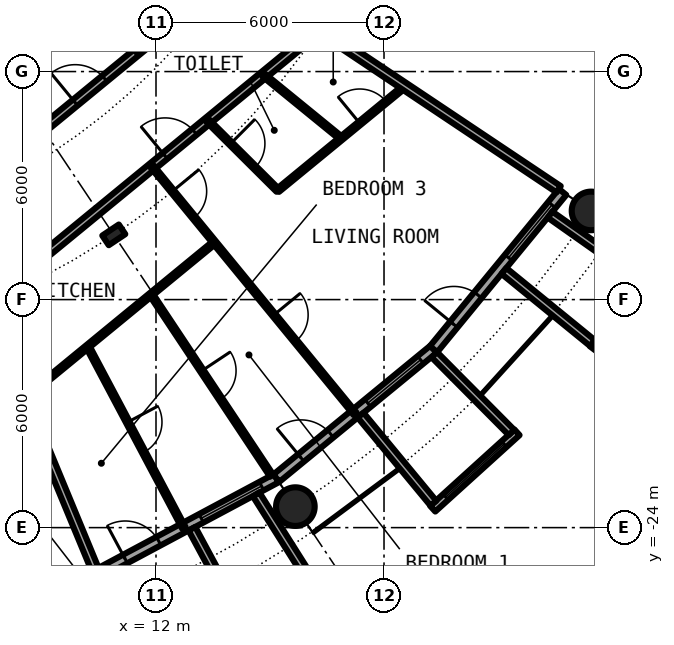
"""IFC4 building model, lengths in metres.
Left out: names, types, materials, properties, quantities, classifications, styles, units other than length and angle.
Written with IfcOpenShell. Run it as: python <this file> out.ifc"""

import sys

from ifc_helpers import new_model, si_unit, direction, frame, frame_2d, origin, origin_2d, place, context, subcontext, project, spatial, rectangle, circle, hollow_circle, i_section, extrude, element, fill, save


model = new_model("IFC4")
c1 = context("Model", 3, precision=1e-05, world=origin(), true_north=direction((0.0, 1.0)))
c2 = subcontext(c1, "Body", "Model", "MODEL_VIEW")
j1 = project(units=[si_unit("LENGTHUNIT", "METRE"), si_unit("PLANEANGLEUNIT", "RADIAN")], contexts=[c1])
p1 = place(None, origin())
s1 = spatial("IfcSite", under=j1, at=p1, CompositionType="ELEMENT")
p2 = place(p1, origin())
s2 = spatial("IfcBuilding", under=s1, at=p2, CompositionType="ELEMENT")
p3 = place(p2, frame((0.0, 0.0, 63.6)))
s3 = spatial("IfcBuildingStorey", under=s2, at=p3, CompositionType="ELEMENT", Elevation=63.6)
for number, where, z_axis, x_axis in (
    (1, (15.667, -23.448, 0.0), (0.0, 0.0, 1.0), (1.0, 0.0, 0.0)),
    (2, (23.448, -15.667, 0.0), (0.0, 0.0, 1.0), (1.0, 0.0, 0.0)),
):
    element("IfcColumn", number, at=place(p3, frame(where, z_axis=z_axis, x_axis=x_axis)), inside=s3, PredefinedType="COLUMN", context=c2, shape_type="SweptSolid", body=[
        extrude(hollow_circle(Radius=0.508, WallThickness=0.04, at=origin_2d()), origin(), (0.0, 0.0, 1.0), 3.05),
    ])
p4 = place(p3, frame((10.889, -16.297, 0.0), z_axis=(0.0, 0.0, 1.0), x_axis=(0.55557023302, -0.831469612303, 0.0)))
e3 = element("IfcColumn", 3, at=p4, inside=s3, PredefinedType="COLUMN", context=c2, shape_type="SweptSolid", body=[
    extrude(i_section(OverallWidth=0.306, OverallDepth=0.524, WebThickness=0.021, FlangeThickness=0.04, FilletRadius=0.027, at=origin_2d()), origin(), (0.0, 0.0, 1.0), 3.05),
])
p5 = place(p3, frame((10.447, -25.222, 0.0), z_axis=(0.0, 0.0, 1.0), x_axis=(0.881915646801, 0.471407246368, 0.0)))
e4 = element("IfcWall", 4, at=p5, inside=s3, PredefinedType="SOLIDWALL", context=c2, shape_type="SweptSolid", body=[
    extrude(rectangle(XDim=5.352, YDim=0.25, at=frame_2d((2.676, 0.0))), origin(), (0.0, 0.0, 1.0), 2.7),
])
p6 = place(p5, frame((0.841, 0.0, 0.0)))
e5 = element("IfcOpeningElement", 5, at=p6, cuts=e4, PredefinedType="OPENING", context=c2, shape_type="SweptSolid", body=[
    extrude(rectangle(XDim=1.0, YDim=2.2, at=frame_2d((0.5, 1.1))), frame((0.0, 0.135, 0.0), z_axis=(0.0, -1.0, 0.0), x_axis=(1.0, 0.0, 0.0)), (0.0, 0.0, 1.0), 0.27),
])
p7 = place(p5, frame((3.111, 0.0, 0.3)))
e6 = element("IfcOpeningElement", 6, at=p7, cuts=e4, PredefinedType="OPENING", context=c2, shape_type="SweptSolid", body=[
    extrude(rectangle(XDim=1.8, YDim=2.1, at=frame_2d((0.9, 1.05))), frame((0.0, 0.135, 0.0), z_axis=(0.0, -1.0, 0.0), x_axis=(1.0, 0.0, 0.0)), (0.0, 0.0, 1.0), 0.27),
])
p8 = place(p3, frame((12.945, -24.029, -0.03), z_axis=(0.0, 0.0, 1.0), x_axis=(0.474424310775, -0.88029629861, 0.0)))
e7 = element("IfcWall", 7, at=p8, inside=s3, PredefinedType="SOLIDWALL", context=c2, shape_type="SweptSolid", body=[
    extrude(rectangle(XDim=3.006, YDim=0.2, at=frame_2d((1.503, 0.0))), origin(), (0.0, 0.0, 1.0), 2.73),
])
p9 = place(p3, frame((14.635, -23.126, -0.03), z_axis=(0.0, 0.0, 1.0), x_axis=(0.534437802731, -0.845207805816, 0.0)))
e8 = element("IfcWall", 8, at=p9, inside=s3, PredefinedType="SOLIDWALL", context=c2, shape_type="SweptSolid", body=[
    extrude(rectangle(XDim=2.932, YDim=0.2, at=frame_2d((1.466, 0.0))), origin(), (0.0, 0.0, 1.0), 2.73),
])
p10 = place(p3, frame((15.167, -22.699, 0.0), z_axis=(0.0, 0.0, 1.0), x_axis=(0.773019449054, 0.634382322723, 0.0)))
e9 = element("IfcWall", 9, at=p10, inside=s3, PredefinedType="SOLIDWALL", context=c2, shape_type="SweptSolid", body=[
    extrude(rectangle(XDim=5.352, YDim=0.25, at=frame_2d((2.676, 0.0))), origin(), (0.0, 0.0, 1.0), 2.7),
])
p11 = place(p10, frame((0.841, 0.0, 0.0)))
e10 = element("IfcOpeningElement", 10, at=p11, cuts=e9, PredefinedType="OPENING", context=c2, shape_type="SweptSolid", body=[
    extrude(rectangle(XDim=1.0, YDim=2.2, at=frame_2d((0.5, 1.1))), frame((0.0, 0.135, 0.0), z_axis=(0.0, -1.0, 0.0), x_axis=(1.0, 0.0, 0.0)), (0.0, 0.0, 1.0), 0.27),
])
p12 = place(p10, frame((3.111, 0.0, 0.3)))
e11 = element("IfcOpeningElement", 11, at=p12, cuts=e9, PredefinedType="OPENING", context=c2, shape_type="SweptSolid", body=[
    extrude(rectangle(XDim=1.8, YDim=2.1, at=frame_2d((0.9, 1.05))), frame((0.0, 0.135, 0.0), z_axis=(0.0, -1.0, 0.0), x_axis=(1.0, 0.0, 0.0)), (0.0, 0.0, 1.0), 0.27),
])
p13 = place(p3, frame((19.282, -23.503, -0.03), z_axis=(0.0, 0.0, 1.0), x_axis=(0.740998365753, 0.671506829416, 0.0)))
e12 = element("IfcWall", 12, at=p13, inside=s3, PredefinedType="SOLIDWALL", context=c2, shape_type="SweptSolid", body=[
    extrude(rectangle(XDim=2.993, YDim=0.2, at=frame_2d((1.497, 0.0))), origin(), (0.0, 0.0, 1.0), 2.73),
])
p14 = place(p13, frame((0.457, 0.0, 0.33)))
e13 = element("IfcOpeningElement", 13, at=p14, cuts=e12, PredefinedType="OPENING", context=c2, shape_type="SweptSolid", body=[
    extrude(circle(Radius=1.04, at=frame_2d((1.04, 1.04))), frame((0.0, 0.11, 0.0), z_axis=(0.0, -1.0, 0.0), x_axis=(1.0, 0.0, 0.0)), (0.0, 0.0, 1.0), 0.22),
])
p15 = place(p3, frame((17.384, -21.041, -0.03), z_axis=(0.0, 0.0, 1.0), x_axis=(0.63709551667, -0.770784861449, 0.0)))
e14 = element("IfcWall", 14, at=p15, inside=s3, PredefinedType="SOLIDWALL", context=c2, shape_type="SweptSolid", body=[
    extrude(rectangle(XDim=3.006, YDim=0.2, at=frame_2d((1.503, 0.0))), origin(), (0.0, 0.0, 1.0), 2.73),
])
p16 = place(p3, frame((19.323, -19.45, -0.03), z_axis=(0.0, 0.0, 1.0), x_axis=(0.704476739375, -0.709727076896, 0.0)))
e15 = element("IfcWall", 15, at=p16, inside=s3, PredefinedType="SOLIDWALL", context=c2, shape_type="SweptSolid", body=[
    extrude(rectangle(XDim=2.883, YDim=0.2, at=frame_2d((1.441, 0.0))), origin(), (0.0, 0.0, 1.0), 2.73),
])
p17 = place(p3, frame((19.304, -19.304, 0.0), z_axis=(0.0, 0.0, 1.0), x_axis=(0.634382322723, 0.773019449054, 0.0)))
e16 = element("IfcWall", 16, at=p17, inside=s3, PredefinedType="SOLIDWALL", context=c2, shape_type="SweptSolid", body=[
    extrude(rectangle(XDim=5.352, YDim=0.25, at=frame_2d((2.676, 0.0))), origin(), (0.0, 0.0, 1.0), 2.7),
])
p18 = place(p17, frame((0.841, 0.0, 0.0)))
e17 = element("IfcOpeningElement", 17, at=p18, cuts=e16, PredefinedType="OPENING", context=c2, shape_type="SweptSolid", body=[
    extrude(rectangle(XDim=1.0, YDim=2.2, at=frame_2d((0.5, 1.1))), frame((0.0, 0.135, 0.0), z_axis=(0.0, -1.0, 0.0), x_axis=(1.0, 0.0, 0.0)), (0.0, 0.0, 1.0), 0.27),
])
p19 = place(p17, frame((3.111, 0.0, 0.3)))
e18 = element("IfcOpeningElement", 18, at=p19, cuts=e16, PredefinedType="OPENING", context=c2, shape_type="SweptSolid", body=[
    extrude(rectangle(XDim=1.8, YDim=2.1, at=frame_2d((0.9, 1.05))), frame((0.0, 0.135, 0.0), z_axis=(0.0, -1.0, 0.0), x_axis=(1.0, 0.0, 0.0)), (0.0, 0.0, 1.0), 0.27),
])
p20 = place(p3, frame((23.497, -19.289, -0.03), z_axis=(0.0, 0.0, 1.0), x_axis=(0.60418752353, 0.796842165306, 0.0)))
e19 = element("IfcWall", 19, at=p20, inside=s3, PredefinedType="SOLIDWALL", context=c2, shape_type="SweptSolid", body=[
    extrude(rectangle(XDim=2.337, YDim=0.2, at=frame_2d((1.168, 0.0))), origin(), (0.0, 0.0, 1.0), 2.73),
])
p21 = place(p20, frame((0.128, 0.0, 0.33)))
e20 = element("IfcOpeningElement", 20, at=p21, cuts=e19, PredefinedType="OPENING", context=c2, shape_type="SweptSolid", body=[
    extrude(circle(Radius=1.04, at=frame_2d((1.04, 1.04))), frame((0.0, 0.11, 0.0), z_axis=(0.0, -1.0, 0.0), x_axis=(1.0, 0.0, 0.0)), (0.0, 0.0, 1.0), 0.22),
])
p22 = place(p3, frame((21.155, -17.246, -0.03), z_axis=(0.0, 0.0, 1.0), x_axis=(0.775179004516, -0.631741648902, 0.0)))
e21 = element("IfcWall", 21, at=p22, inside=s3, PredefinedType="SOLIDWALL", context=c2, shape_type="SweptSolid", body=[
    extrude(rectangle(XDim=3.006, YDim=0.2, at=frame_2d((1.503, 0.0))), origin(), (0.0, 0.0, 1.0), 2.73),
])
p23 = place(p3, frame((22.37, -15.765, -0.03), z_axis=(0.0, 0.0, 1.0), x_axis=(0.817256123454, -0.576274612209, 0.0)))
e22 = element("IfcWall", 22, at=p23, inside=s3, PredefinedType="SOLIDWALL", context=c2, shape_type="SweptSolid", body=[
    extrude(rectangle(XDim=2.933, YDim=0.2, at=frame_2d((1.466, 0.0))), origin(), (0.0, 0.0, 1.0), 2.73),
])
p24 = place(p3, frame((8.534, -20.603, 0.0), z_axis=(0.0, 0.0, 1.0), x_axis=(0.773000340237, 0.634405606843, 0.0)))
e23 = element("IfcWall", 23, at=p24, inside=s3, PredefinedType="PARTITIONING", context=c2, shape_type="SweptSolid", body=[
    extrude(rectangle(XDim=6.474, YDim=0.1, at=frame_2d((3.237, 0.0))), origin(), (0.0, 0.0, 1.0), 2.7),
])
p25 = place(p3, frame((15.206, -15.127, 0.0), z_axis=(0.0, 0.0, 1.0), x_axis=(0.772975913823, 0.634435368379, 0.0)))
e24 = element("IfcWall", 24, at=p25, inside=s3, PredefinedType="PARTITIONING", context=c2, shape_type="SweptSolid", body=[
    extrude(rectangle(XDim=4.316, YDim=0.1, at=frame_2d((2.158, 0.0))), origin(), (0.0, 0.0, 1.0), 2.7),
])
p26 = place(p25, frame((2.787, 0.0, 0.0)))
e25 = element("IfcOpeningElement", 25, at=p26, cuts=e24, PredefinedType="OPENING", context=c2, shape_type="SweptSolid", body=[
    extrude(rectangle(XDim=0.9, YDim=2.3, at=frame_2d((0.45, 1.15))), frame((0.0, 0.06, 0.0), z_axis=(0.0, -1.0, 0.0), x_axis=(1.0, 0.0, 0.0)), (0.0, 0.0, 1.0), 0.12),
])
p27 = place(p3, frame((7.498, -18.109, 0.0), z_axis=(0.0, 0.0, 1.0), x_axis=(0.773076379635, 0.634312944256, 0.0)))
e26 = element("IfcWall", 26, at=p27, inside=s3, PredefinedType="PARTITIONING", context=c2, shape_type="SweptSolid", body=[
    extrude(rectangle(XDim=11.221, YDim=0.2, at=frame_2d((5.611, 0.0))), origin(), (0.0, 0.0, 1.0), 2.38),
])
p28 = place(p27, frame((6.132, 0.0, 0.0)))
e27 = element("IfcOpeningElement", 27, at=p28, cuts=e26, PredefinedType="OPENING", context=c2, shape_type="SweptSolid", body=[
    extrude(rectangle(XDim=1.0, YDim=2.3, at=frame_2d((0.5, 1.15))), frame((0.0, 0.11, 0.0), z_axis=(0.0, -1.0, 0.0), x_axis=(1.0, 0.0, 0.0)), (0.0, 0.0, 1.0), 0.22),
])
p29 = place(p3, frame((6.467, -15.614, 0.0), z_axis=(0.0, 0.0, 1.0), x_axis=(0.773074935257, 0.634314704605, 0.0)))
e28 = element("IfcWall", 28, at=p29, inside=s3, PredefinedType="PARTITIONING", context=c2, shape_type="SweptSolid", body=[
    extrude(rectangle(XDim=9.809, YDim=0.2, at=frame_2d((4.904, 0.0))), origin(), (0.0, 0.0, 1.0), 2.7),
])
p30 = place(p29, frame((4.407, 0.0, 0.0)))
e29 = element("IfcOpeningElement", 29, at=p30, cuts=e28, PredefinedType="OPENING", context=c2, shape_type="SweptSolid", body=[
    extrude(rectangle(XDim=1.0, YDim=2.3, at=frame_2d((0.5, 1.15))), frame((0.0, 0.11, 0.0), z_axis=(0.0, -1.0, 0.0), x_axis=(1.0, 0.0, 0.0)), (0.0, 0.0, 1.0), 0.22),
])
p31 = place(p3, frame((7.501, -18.108, 0.0), z_axis=(0.0, 0.0, 1.0), x_axis=(0.382600411313, -0.923913916587, 0.0)))
e30 = element("IfcWall", 30, at=p31, inside=s3, PredefinedType="PARTITIONING", context=c2, shape_type="SweptSolid", body=[
    extrude(rectangle(XDim=7.574, YDim=0.2, at=frame_2d((3.787, 0.0))), origin(), (0.0, 0.0, 1.0), 2.7),
])
p32 = place(p3, frame((9.683, -9.632, 0.0), z_axis=(0.0, 0.0, 1.0), x_axis=(0.708796844581, -0.705412668665, 0.0)))
e31 = element("IfcWall", 31, at=p32, inside=s3, PredefinedType="PARTITIONING", context=c2, shape_type="SweptSolid", body=[
    extrude(rectangle(XDim=2.597, YDim=0.1, at=frame_2d((1.299, 0.0))), origin(), (0.0, 0.0, 1.0), 2.7),
])
p33 = place(p32, frame((0.849, 0.0, 0.0)))
e32 = element("IfcOpeningElement", 32, at=p33, cuts=e31, PredefinedType="OPENING", context=c2, shape_type="SweptSolid", body=[
    extrude(rectangle(XDim=0.9, YDim=2.3, at=frame_2d((0.45, 1.15))), frame((0.0, 0.06, 0.0), z_axis=(0.0, -1.0, 0.0), x_axis=(1.0, 0.0, 0.0)), (0.0, 0.0, 1.0), 0.12),
])
p34 = place(p3, frame((10.202, -19.234, 0.0), z_axis=(0.0, 0.0, 1.0), x_axis=(0.468610030042, -0.883405139075, 0.0)))
e33 = element("IfcWall", 33, at=p34, inside=s3, PredefinedType="PARTITIONING", context=c2, shape_type="SweptSolid", body=[
    extrude(rectangle(XDim=5.403, YDim=0.1, at=frame_2d((2.702, 0.0))), origin(), (0.0, 0.0, 1.0), 2.7),
])
p35 = place(p34, frame((2.252, 0.0, 0.0)))
e34 = element("IfcOpeningElement", 34, at=p35, cuts=e33, PredefinedType="OPENING", context=c2, shape_type="SweptSolid", body=[
    extrude(rectangle(XDim=0.9, YDim=2.3, at=frame_2d((0.45, 1.15))), frame((0.0, 0.06, 0.0), z_axis=(0.0, -1.0, 0.0), x_axis=(1.0, 0.0, 0.0)), (0.0, 0.0, 1.0), 0.12),
])
p36 = place(p3, frame((11.871, -17.864, 0.0), z_axis=(0.0, 0.0, 1.0), x_axis=(0.553637025191, -0.83275809473, 0.0)))
e35 = element("IfcWall", 35, at=p36, inside=s3, PredefinedType="PARTITIONING", context=c2, shape_type="SweptSolid", body=[
    extrude(rectangle(XDim=5.726, YDim=0.1, at=frame_2d((2.863, 0.0))), origin(), (0.0, 0.0, 1.0), 2.7),
])
p37 = place(p36, frame((2.413, 0.0, 0.0)))
e36 = element("IfcOpeningElement", 36, at=p37, cuts=e35, PredefinedType="OPENING", context=c2, shape_type="SweptSolid", body=[
    extrude(rectangle(XDim=0.9, YDim=2.3, at=frame_2d((0.45, 1.15))), frame((0.0, 0.06, 0.0), z_axis=(0.0, -1.0, 0.0), x_axis=(1.0, 0.0, 0.0)), (0.0, 0.0, 1.0), 0.12),
])
p38 = place(p3, frame((11.899, -14.499, 0.0), z_axis=(0.0, 0.0, 1.0), x_axis=(0.634396151441, -0.77300810024, 0.0)))
e37 = element("IfcWall", 37, at=p38, inside=s3, PredefinedType="PARTITIONING", context=c2, shape_type="SweptSolid", body=[
    extrude(rectangle(XDim=8.419, YDim=0.1, at=frame_2d((4.209, 0.0))), origin(), (0.0, 0.0, 1.0), 2.7),
])
p39 = place(p38, frame((0.842, 0.0, 0.0)))
e38 = element("IfcOpeningElement", 38, at=p39, cuts=e37, PredefinedType="OPENING", context=c2, shape_type="SweptSolid", body=[
    extrude(rectangle(XDim=0.9, YDim=2.3, at=frame_2d((0.45, 1.15))), frame((0.0, 0.06, 0.0), z_axis=(0.0, -1.0, 0.0), x_axis=(1.0, 0.0, 0.0)), (0.0, 0.0, 1.0), 0.12),
])
p40 = place(p38, frame((5.051, 0.0, 0.0)))
e39 = element("IfcOpeningElement", 39, at=p40, cuts=e37, PredefinedType="OPENING", context=c2, shape_type="SweptSolid", body=[
    extrude(rectangle(XDim=0.9, YDim=2.3, at=frame_2d((0.45, 1.15))), frame((0.0, 0.06, 0.0), z_axis=(0.0, -1.0, 0.0), x_axis=(1.0, 0.0, 0.0)), (0.0, 0.0, 1.0), 0.12),
])
p41 = place(p3, frame((13.365, -13.296, 0.0), z_axis=(0.0, 0.0, 1.0), x_axis=(0.708843617398, -0.705365668341, 0.0)))
e40 = element("IfcWall", 40, at=p41, inside=s3, PredefinedType="PARTITIONING", context=c2, shape_type="SweptSolid", body=[
    extrude(rectangle(XDim=2.597, YDim=0.1, at=frame_2d((1.299, 0.0))), origin(), (0.0, 0.0, 1.0), 2.7),
])
p42 = place(p41, frame((0.848, 0.0, 0.0)))
e41 = element("IfcOpeningElement", 41, at=p42, cuts=e40, PredefinedType="OPENING", context=c2, shape_type="SweptSolid", body=[
    extrude(rectangle(XDim=0.9, YDim=2.3, at=frame_2d((0.45, 1.15))), frame((0.0, 0.06, 0.0), z_axis=(0.0, -1.0, 0.0), x_axis=(1.0, 0.0, 0.0)), (0.0, 0.0, 1.0), 0.12),
])
p43 = place(p3, frame((14.831, -12.092, 0.0), z_axis=(0.0, 0.0, 1.0), x_axis=(0.774979608522, -0.631986239072, 0.0)))
e42 = element("IfcWall", 42, at=p43, inside=s3, PredefinedType="PARTITIONING", context=c2, shape_type="SweptSolid", body=[
    extrude(rectangle(XDim=2.636, YDim=0.1, at=frame_2d((1.318, 0.0))), origin(), (0.0, 0.0, 1.0), 2.7),
])
p44 = place(p3, frame((16.515, -11.035, 0.0), z_axis=(0.0, 0.0, 1.0), x_axis=(0.831505405283, -0.555516661303, 0.0)))
e43 = element("IfcWall", 43, at=p44, inside=s3, PredefinedType="PARTITIONING", context=c2, shape_type="SweptSolid", body=[
    extrude(rectangle(XDim=7.312, YDim=0.2, at=frame_2d((3.656, 0.0))), origin(), (0.0, 0.0, 1.0), 2.7),
])
p45 = place(p6, origin())
e44 = element("IfcDoor", 44, at=p45, inside=s3, OperationType="SINGLE_SWING_LEFT", PredefinedType="DOOR", context=c2, shape_type="SweptSolid", body=[
    extrude(rectangle(XDim=1.0, YDim=2.2, at=frame_2d((0.5, 1.1))), frame((0.0, 0.025, 0.0), z_axis=(0.0, -1.0, 0.0), x_axis=(1.0, 0.0, 0.0)), (0.0, 0.0, 1.0), 0.05),
])
fill(e5, e44)
p46 = place(p7, origin())
e45 = element("IfcWindow", 45, at=p46, inside=s3, PartitioningType="SINGLE_PANEL", PredefinedType="WINDOW", context=c2, shape_type="SweptSolid", body=[
    extrude(rectangle(XDim=1.8, YDim=2.1, at=frame_2d((0.9, 1.05))), frame((0.0, 0.03, 0.0), z_axis=(0.0, -1.0, 0.0), x_axis=(1.0, 0.0, 0.0)), (0.0, 0.0, 1.0), 0.06),
])
fill(e6, e45)
p47 = place(p11, origin())
e46 = element("IfcDoor", 46, at=p47, inside=s3, OperationType="SINGLE_SWING_LEFT", PredefinedType="DOOR", context=c2, shape_type="SweptSolid", body=[
    extrude(rectangle(XDim=1.0, YDim=2.2, at=frame_2d((0.5, 1.1))), frame((0.0, 0.025, 0.0), z_axis=(0.0, -1.0, 0.0), x_axis=(1.0, 0.0, 0.0)), (0.0, 0.0, 1.0), 0.05),
])
fill(e10, e46)
p48 = place(p12, origin())
e47 = element("IfcWindow", 47, at=p48, inside=s3, PartitioningType="SINGLE_PANEL", PredefinedType="WINDOW", context=c2, shape_type="SweptSolid", body=[
    extrude(rectangle(XDim=1.8, YDim=2.1, at=frame_2d((0.9, 1.05))), frame((0.0, 0.03, 0.0), z_axis=(0.0, -1.0, 0.0), x_axis=(1.0, 0.0, 0.0)), (0.0, 0.0, 1.0), 0.06),
])
fill(e11, e47)
p49 = place(p14, origin())
e48 = element("IfcWindow", 48, at=p49, inside=s3, PartitioningType="SINGLE_PANEL", PredefinedType="WINDOW", context=c2, shape_type="SweptSolid", body=[
    extrude(circle(Radius=1.04, at=frame_2d((1.04, 1.04))), frame((0.0, 0.03, 0.0), z_axis=(0.0, -1.0, 0.0), x_axis=(1.0, 0.0, 0.0)), (0.0, 0.0, 1.0), 0.06),
])
fill(e13, e48)
p50 = place(p18, origin())
e49 = element("IfcDoor", 49, at=p50, inside=s3, OperationType="SINGLE_SWING_LEFT", PredefinedType="DOOR", context=c2, shape_type="SweptSolid", body=[
    extrude(rectangle(XDim=1.0, YDim=2.2, at=frame_2d((0.5, 1.1))), frame((0.0, 0.025, 0.0), z_axis=(0.0, -1.0, 0.0), x_axis=(1.0, 0.0, 0.0)), (0.0, 0.0, 1.0), 0.05),
])
fill(e17, e49)
p51 = place(p19, origin())
e50 = element("IfcWindow", 50, at=p51, inside=s3, PartitioningType="SINGLE_PANEL", PredefinedType="WINDOW", context=c2, shape_type="SweptSolid", body=[
    extrude(rectangle(XDim=1.8, YDim=2.1, at=frame_2d((0.9, 1.05))), frame((0.0, 0.03, 0.0), z_axis=(0.0, -1.0, 0.0), x_axis=(1.0, 0.0, 0.0)), (0.0, 0.0, 1.0), 0.06),
])
fill(e18, e50)
p52 = place(p28, origin())
e51 = element("IfcDoor", 51, at=p52, inside=s3, OperationType="SINGLE_SWING_RIGHT", PredefinedType="DOOR", context=c2, shape_type="SweptSolid", body=[
    extrude(rectangle(XDim=1.0, YDim=2.3, at=frame_2d((0.5, 1.15))), frame((0.0, 0.025, 0.0), z_axis=(0.0, -1.0, 0.0), x_axis=(1.0, 0.0, 0.0)), (0.0, 0.0, 1.0), 0.05),
])
fill(e27, e51)
p53 = place(p26, origin())
e52 = element("IfcDoor", 52, at=p53, inside=s3, OperationType="SINGLE_SWING_RIGHT", PredefinedType="DOOR", context=c2, shape_type="SweptSolid", body=[
    extrude(rectangle(XDim=0.9, YDim=2.3, at=frame_2d((0.45, 1.15))), frame((0.0, 0.025, 0.0), z_axis=(0.0, -1.0, 0.0), x_axis=(1.0, 0.0, 0.0)), (0.0, 0.0, 1.0), 0.05),
])
fill(e25, e52)
p54 = place(p42, origin())
e53 = element("IfcDoor", 53, at=p54, inside=s3, OperationType="SINGLE_SWING_LEFT", PredefinedType="DOOR", context=c2, shape_type="SweptSolid", body=[
    extrude(rectangle(XDim=0.9, YDim=2.3, at=frame_2d((0.45, 1.15))), frame((0.0, 0.025, 0.0), z_axis=(0.0, -1.0, 0.0), x_axis=(1.0, 0.0, 0.0)), (0.0, 0.0, 1.0), 0.05),
])
fill(e41, e53)
p55 = place(p39, origin())
e54 = element("IfcDoor", 54, at=p55, inside=s3, OperationType="SINGLE_SWING_LEFT", PredefinedType="DOOR", context=c2, shape_type="SweptSolid", body=[
    extrude(rectangle(XDim=0.9, YDim=2.3, at=frame_2d((0.45, 1.15))), frame((0.0, 0.025, 0.0), z_axis=(0.0, -1.0, 0.0), x_axis=(1.0, 0.0, 0.0)), (0.0, 0.0, 1.0), 0.05),
])
fill(e38, e54)
p56 = place(p40, origin())
e55 = element("IfcDoor", 55, at=p56, inside=s3, OperationType="SINGLE_SWING_RIGHT", PredefinedType="DOOR", context=c2, shape_type="SweptSolid", body=[
    extrude(rectangle(XDim=0.9, YDim=2.3, at=frame_2d((0.45, 1.15))), frame((0.0, 0.025, 0.0), z_axis=(0.0, -1.0, 0.0), x_axis=(1.0, 0.0, 0.0)), (0.0, 0.0, 1.0), 0.05),
])
fill(e39, e55)
p57 = place(p37, origin())
e56 = element("IfcDoor", 56, at=p57, inside=s3, OperationType="SINGLE_SWING_RIGHT", PredefinedType="DOOR", context=c2, shape_type="SweptSolid", body=[
    extrude(rectangle(XDim=0.9, YDim=2.3, at=frame_2d((0.45, 1.15))), frame((0.0, 0.025, 0.0), z_axis=(0.0, -1.0, 0.0), x_axis=(1.0, 0.0, 0.0)), (0.0, 0.0, 1.0), 0.05),
])
fill(e36, e56)
p58 = place(p35, origin())
e57 = element("IfcDoor", 57, at=p58, inside=s3, OperationType="SINGLE_SWING_RIGHT", PredefinedType="DOOR", context=c2, shape_type="SweptSolid", body=[
    extrude(rectangle(XDim=0.9, YDim=2.3, at=frame_2d((0.45, 1.15))), frame((0.0, 0.025, 0.0), z_axis=(0.0, -1.0, 0.0), x_axis=(1.0, 0.0, 0.0)), (0.0, 0.0, 1.0), 0.05),
])
fill(e34, e57)
p59 = place(p30, origin())
e58 = element("IfcDoor", 58, at=p59, inside=s3, OperationType="SINGLE_SWING_RIGHT", PredefinedType="DOOR", context=c2, shape_type="SweptSolid", body=[
    extrude(rectangle(XDim=1.0, YDim=2.3, at=frame_2d((0.5, 1.15))), frame((0.0, 0.025, 0.0), z_axis=(0.0, -1.0, 0.0), x_axis=(1.0, 0.0, 0.0)), (0.0, 0.0, 1.0), 0.05),
])
fill(e29, e58)
save(model, sys.argv[1])
